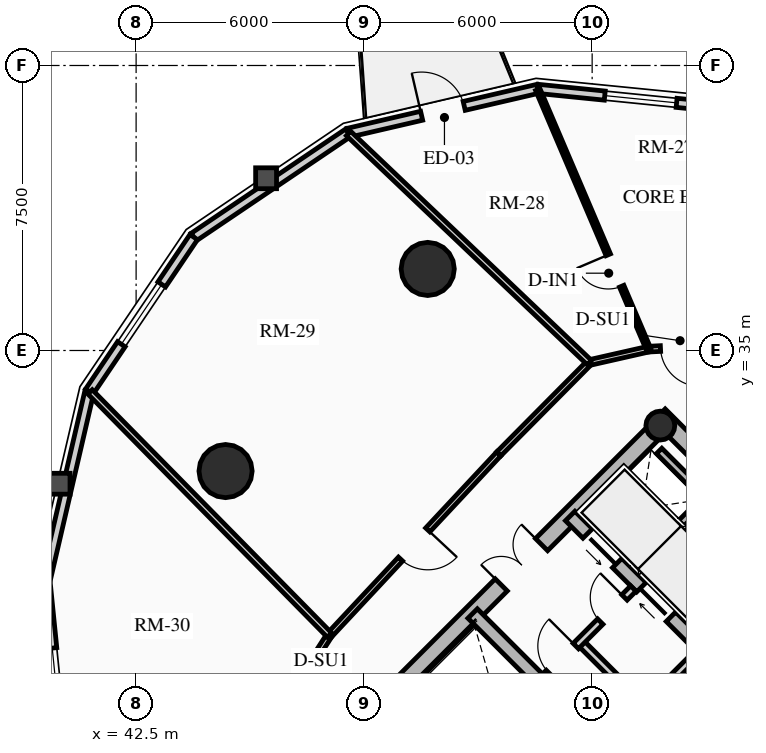
"""IFC4 building model, lengths in metres.
Left out: names, types, materials, properties, quantities, classifications, styles, units other than length and angle.
Written with IfcOpenShell. Run it as: python <this file> out.ifc"""

import sys

from ifc_helpers import new_model, si_unit, direction, frame, frame_2d, origin, origin_2d, place, context, subcontext, project, spatial, rectangle, circle, hollow_circle, extrude, source, transform, mapped, element, fill, save


model = new_model("IFC4")
c1 = context("Model", 3, precision=1e-05, world=origin(), true_north=direction((0.0, 1.0)))
c2 = subcontext(c1, "Body", "Model", "MODEL_VIEW")
j1 = project(units=[si_unit("LENGTHUNIT", "METRE"), si_unit("PLANEANGLEUNIT", "RADIAN")], contexts=[c1])
p1 = place(None, origin())
s1 = spatial("IfcSite", under=j1, at=p1, CompositionType="ELEMENT")
p2 = place(p1, origin())
s2 = spatial("IfcBuilding", under=s1, at=p2, CompositionType="ELEMENT")
p3 = place(p2, frame((0.0, 0.0, 78.88)))
s3 = spatial("IfcBuildingStorey", under=s2, at=p3, CompositionType="ELEMENT", Elevation=78.88)
p4 = place(p3, frame((66.303, 23.263, 0.0), z_axis=(0.0, 0.0, 1.0), x_axis=(-0.707106781187, 0.707106781187, 0.0)))
e1 = element("IfcWall", 1, at=p4, inside=s3, PredefinedType="SHEAR", context=c2, shape_type="SweptSolid", body=[
    extrude(rectangle(XDim=14.2, YDim=0.45, at=frame_2d((7.1, 0.0))), origin(), (0.0, 0.0, 1.0), 2.91),
])
p5 = place(p3, frame((48.856, 25.578, 0.0), z_axis=(0.0, 0.0, 1.0), x_axis=(0.707106781187, 0.707106781187, 0.0)))
e2 = element("IfcWall", 2, at=p5, inside=s3, PredefinedType="SHEAR", context=c2, shape_type="SweptSolid", body=[
    extrude(rectangle(XDim=10.7, YDim=0.45, at=frame_2d((5.35, 0.0))), origin(), (0.0, 0.0, 1.0), 2.91),
])
m1 = source(origin(), c2, "Body", "SweptSolid", [
    extrude(rectangle(XDim=1.5, YDim=2.02, at=frame_2d((0.75, 1.01))), frame((0.0, 0.235, 0.0), z_axis=(0.0, -1.0, 0.0), x_axis=(1.0, 0.0, 0.0)), (0.0, 0.0, 1.0), 0.47),
])
p6 = place(p5, frame((4.6, 0.0, 0.0)))
e3 = element("IfcOpeningElement", 3, at=p6, cuts=e2, PredefinedType="OPENING", context=c2, shape_type="MappedRepresentation", body=[
    mapped(m1, transform((0.0, 0.0, 0.0), x_axis=(1.0, 0.0, 0.0), y_axis=(0.0, 1.0, 0.0), z_axis=(0.0, 0.0, 1.0), scale=1.0)),
])
p7 = place(p3, frame((61.078, 18.355, 0.0), z_axis=(0.0, 0.0, 1.0), x_axis=(-0.707106781187, 0.707106781187, 0.0)))
e4 = element("IfcWall", 4, at=p7, inside=s3, PredefinedType="SHEAR", context=c2, shape_type="SweptSolid", body=[
    extrude(rectangle(XDim=13.75, YDim=0.35, at=frame_2d((6.875, 0.0))), origin(), (0.0, 0.0, 1.0), 2.91),
])
m2 = source(origin(), c2, "Body", "SweptSolid", [
    extrude(rectangle(XDim=1.1, YDim=2.015, at=frame_2d((0.55, 1.007))), frame((0.0, 0.185, 0.0), z_axis=(0.0, -1.0, 0.0), x_axis=(1.0, 0.0, 0.0)), (0.0, 0.0, 1.0), 0.37),
])
p8 = place(p7, frame((4.875, 0.0, 0.0)))
e5 = element("IfcOpeningElement", 5, at=p8, cuts=e4, PredefinedType="OPENING", context=c2, shape_type="MappedRepresentation", body=[
    mapped(m2, transform((0.0, 0.0, 0.0), x_axis=(1.0, 0.0, 0.0), y_axis=(0.0, 1.0, 0.0), z_axis=(0.0, 0.0, 1.0), scale=1.0)),
])
m3 = source(origin(), c2, "Body", "SweptSolid", [
    extrude(rectangle(XDim=1.15, YDim=2.02, at=frame_2d((0.575, 1.01))), frame((0.0, 0.185, 0.0), z_axis=(0.0, -1.0, 0.0), x_axis=(1.0, 0.0, 0.0)), (0.0, 0.0, 1.0), 0.37),
])
p9 = place(p7, frame((7.295, 0.0, 0.0)))
e6 = element("IfcOpeningElement", 6, at=p9, cuts=e4, PredefinedType="OPENING", context=c2, shape_type="MappedRepresentation", body=[
    mapped(m3, transform((0.0, 0.0, 0.0), x_axis=(1.0, 0.0, 0.0), y_axis=(0.0, 1.0, 0.0), z_axis=(0.0, 0.0, 1.0), scale=1.0)),
])
p10 = place(p3, frame((63.645, 20.922, 0.0), z_axis=(0.0, 0.0, 1.0), x_axis=(-0.707106781187, 0.707106781187, 0.0)))
e7 = element("IfcWall", 7, at=p10, inside=s3, PredefinedType="SHEAR", context=c2, shape_type="SweptSolid", body=[
    extrude(rectangle(XDim=13.75, YDim=0.35, at=frame_2d((6.875, 0.0))), origin(), (0.0, 0.0, 1.0), 2.91),
])
p11 = place(p10, frame((10.0, 0.0, 0.0)))
e8 = element("IfcOpeningElement", 8, at=p11, cuts=e7, PredefinedType="OPENING", context=c2, shape_type="MappedRepresentation", body=[
    mapped(m2, transform((0.0, 0.0, 0.0), x_axis=(1.0, 0.0, 0.0), y_axis=(0.0, 1.0, 0.0), z_axis=(0.0, 0.0, 1.0), scale=1.0)),
])
p12 = place(p10, frame((12.0, 0.0, 0.0)))
e9 = element("IfcOpeningElement", 9, at=p12, cuts=e7, PredefinedType="OPENING", context=c2, shape_type="MappedRepresentation", body=[
    mapped(m2, transform((0.0, 0.0, 0.0), x_axis=(1.0, 0.0, 0.0), y_axis=(0.0, 1.0, 0.0), z_axis=(0.0, 0.0, 1.0), scale=1.0)),
])
p13 = place(p10, frame((5.305, 0.0, 0.0)))
e10 = element("IfcOpeningElement", 10, at=p13, cuts=e7, PredefinedType="OPENING", context=c2, shape_type="MappedRepresentation", body=[
    mapped(m3, transform((0.0, 0.0, 0.0), x_axis=(1.0, 0.0, 0.0), y_axis=(0.0, 1.0, 0.0), z_axis=(0.0, 0.0, 1.0), scale=1.0)),
])
p14 = place(p3, frame((56.294, 33.024, 0.0), z_axis=(0.0, 0.0, 1.0), x_axis=(0.707106781187, 0.707106781187, 0.0)))
e11 = element("IfcColumn", 11, at=p14, inside=s3, PredefinedType="COLUMN", context=c2, shape_type="SweptSolid", body=[
    extrude(hollow_circle(Radius=0.38, WallThickness=0.032, at=origin_2d()), origin(), (0.0, 0.0, 1.0), 2.91),
])
for number, where, z_axis, x_axis in (
    (12, (50.173, 37.146, 0.0), (0.0, 0.0, 1.0), (1.0, 0.0, 0.0)),
    (13, (44.854, 31.827, 0.0), (0.0, 0.0, 1.0), (1.0, 0.0, 0.0)),
):
    element("IfcColumn", number, at=place(p3, frame(where, z_axis=z_axis, x_axis=x_axis)), inside=s3, PredefinedType="USERDEFINED", context=c2, shape_type="SweptSolid", body=[
        extrude(circle(Radius=0.7, at=origin_2d()), origin(), (0.0, 0.0, 1.0), 2.91),
    ])
p15 = place(p3, frame((53.067, 41.885, 0.0), z_axis=(0.0, 0.0, 1.0), x_axis=(0.994971754311, -0.10015591906, 0.0)))
e14 = element("IfcWall", 14, at=p15, inside=s3, PredefinedType="SOLIDWALL", context=c2, shape_type="SweptSolid", body=[
    extrude(rectangle(XDim=5.448, YDim=0.24, at=frame_2d((2.724, 0.0))), origin(), (0.0, 0.0, 1.0), 2.179),
])
m4 = source(origin(), c2, "Body", "SweptSolid", [
    extrude(rectangle(XDim=1.9, YDim=1.35, at=frame_2d((0.95, 0.675))), frame((0.0, 0.13, 0.0), z_axis=(0.0, -1.0, 0.0), x_axis=(1.0, 0.0, 0.0)), (0.0, 0.0, 1.0), 0.26),
])
p16 = place(p15, frame((1.774, 0.0, 0.65)))
e15 = element("IfcOpeningElement", 15, at=p16, cuts=e14, PredefinedType="OPENING", context=c2, shape_type="MappedRepresentation", body=[
    mapped(m4, transform((0.0, 0.0, 0.0), x_axis=(1.0, 0.0, 0.0), y_axis=(0.0, 1.0, 0.0), z_axis=(0.0, 0.0, 1.0), scale=1.0)),
])
p17 = place(p3, frame((48.08, 40.729, 0.0), z_axis=(0.0, 0.0, 1.0), x_axis=(0.974165631126, 0.225834725257, 0.0)))
e16 = element("IfcWall", 16, at=p17, inside=s3, PredefinedType="SOLIDWALL", context=c2, shape_type="SweptSolid", body=[
    extrude(rectangle(XDim=5.119, YDim=0.24, at=frame_2d((2.56, 0.0))), origin(), (0.0, 0.0, 1.0), 2.179),
])
m5 = source(origin(), c2, "Body", "SweptSolid", [
    extrude(rectangle(XDim=1.15, YDim=2.005, at=frame_2d((0.575, 1.002))), frame((0.0, 0.13, 0.0), z_axis=(0.0, -1.0, 0.0), x_axis=(1.0, 0.0, 0.0)), (0.0, 0.0, 1.0), 0.26),
])
p18 = place(p17, frame((1.984, 0.0, 0.0)))
e17 = element("IfcOpeningElement", 17, at=p18, cuts=e16, PredefinedType="OPENING", context=c2, shape_type="MappedRepresentation", body=[
    mapped(m5, transform((0.0, 0.0, 0.0), x_axis=(1.0, 0.0, 0.0), y_axis=(0.0, 1.0, 0.0), z_axis=(0.0, 0.0, 1.0), scale=1.0)),
])
p19 = place(p3, frame((44.015, 37.985, 0.0), z_axis=(0.0, 0.0, 1.0), x_axis=(0.828781148131, 0.559572880421, 0.0)))
e18 = element("IfcWall", 18, at=p19, inside=s3, PredefinedType="SOLIDWALL", context=c2, shape_type="SweptSolid", body=[
    extrude(rectangle(XDim=4.905, YDim=0.24, at=frame_2d((2.452, 0.0))), origin(), (0.0, 0.0, 1.0), 2.179),
])
p20 = place(p3, frame((41.271, 33.92, 0.0), z_axis=(0.0, 0.0, 1.0), x_axis=(0.559572880421, 0.828781148131, 0.0)))
e19 = element("IfcWall", 19, at=p20, inside=s3, PredefinedType="SOLIDWALL", context=c2, shape_type="SweptSolid", body=[
    extrude(rectangle(XDim=4.905, YDim=0.24, at=frame_2d((2.452, 0.0))), origin(), (0.0, 0.0, 1.0), 2.179),
])
p21 = place(p20, frame((1.502, 0.0, 0.65)))
e20 = element("IfcOpeningElement", 20, at=p21, cuts=e19, PredefinedType="OPENING", context=c2, shape_type="MappedRepresentation", body=[
    mapped(m4, transform((0.0, 0.0, 0.0), x_axis=(1.0, 0.0, 0.0), y_axis=(0.0, 1.0, 0.0), z_axis=(0.0, 0.0, 1.0), scale=1.0)),
])
p22 = place(p3, frame((40.115, 28.933, 0.0), z_axis=(0.0, 0.0, 1.0), x_axis=(0.225834725257, 0.974165631126, 0.0)))
e21 = element("IfcWall", 21, at=p22, inside=s3, PredefinedType="SOLIDWALL", context=c2, shape_type="SweptSolid", body=[
    extrude(rectangle(XDim=5.119, YDim=0.24, at=frame_2d((2.56, 0.0))), origin(), (0.0, 0.0, 1.0), 2.179),
])
p23 = place(p3, frame((40.661, 23.513, 0.0), z_axis=(0.0, 0.0, 1.0), x_axis=(-0.10015591906, 0.994971754311, 0.0)))
e22 = element("IfcWall", 22, at=p23, inside=s3, PredefinedType="SOLIDWALL", context=c2, shape_type="SweptSolid", body=[
    extrude(rectangle(XDim=5.448, YDim=0.24, at=frame_2d((2.724, 0.0))), origin(), (0.0, 0.0, 1.0), 2.179),
])
p24 = place(p23, frame((1.774, 0.0, 0.65)))
e23 = element("IfcOpeningElement", 23, at=p24, cuts=e22, PredefinedType="OPENING", context=c2, shape_type="MappedRepresentation", body=[
    mapped(m4, transform((0.0, 0.0, 0.0), x_axis=(1.0, 0.0, 0.0), y_axis=(0.0, 1.0, 0.0), z_axis=(0.0, 0.0, 1.0), scale=1.0)),
])
p25 = place(p3, frame((55.615, 29.227, 0.0), z_axis=(0.0, 0.0, 1.0), x_axis=(0.707147878904, 0.70706568108, 0.0)))
e24 = element("IfcWall", 24, at=p25, inside=s3, PredefinedType="SHEAR", context=c2, shape_type="SweptSolid", body=[
    extrude(rectangle(XDim=2.97, YDim=0.2, at=frame_2d((1.485, 0.0))), origin(), (0.0, 0.0, 1.0), 2.91),
])
p26 = place(p3, frame((57.419, 31.2, 0.0), z_axis=(0.0, 0.0, 1.0), x_axis=(-0.707032117043, 0.707181437447, 0.0)))
e25 = element("IfcWall", 25, at=p26, inside=s3, PredefinedType="SHEAR", context=c2, shape_type="SweptSolid", body=[
    extrude(rectangle(XDim=1.635, YDim=0.2, at=frame_2d((0.817, 0.0))), origin(), (0.0, 0.0, 1.0), 2.91),
])
p27 = place(p3, frame((54.961, 24.719, 0.0), z_axis=(0.0, 0.0, 1.0), x_axis=(0.707106781187, 0.707106781187, 0.0)))
e26 = element("IfcWall", 26, at=p27, inside=s3, PredefinedType="PARTITIONING", context=c2, shape_type="SweptSolid", body=[
    extrude(rectangle(XDim=3.28, YDim=0.2, at=frame_2d((1.64, 0.0))), origin(), (0.0, 0.0, 1.0), 2.655),
])
m6 = source(origin(), c2, "Body", "SweptSolid", [
    extrude(rectangle(XDim=0.9, YDim=2.005, at=frame_2d((0.45, 1.002))), frame((0.0, 0.11, 0.0), z_axis=(0.0, -1.0, 0.0), x_axis=(1.0, 0.0, 0.0)), (0.0, 0.0, 1.0), 0.22),
])
p28 = place(p27, frame((0.16, 0.0, 0.0)))
e27 = element("IfcOpeningElement", 27, at=p28, cuts=e26, PredefinedType="OPENING", context=c2, shape_type="MappedRepresentation", body=[
    mapped(m6, transform((0.0, 0.0, 0.0), x_axis=(1.0, 0.0, 0.0), y_axis=(0.0, 1.0, 0.0), z_axis=(0.0, 0.0, 1.0), scale=1.0)),
])
p29 = place(p3, frame((55.874, 25.631, 0.0), z_axis=(0.0, 0.0, 1.0), x_axis=(-0.707157639372, 0.707055919343, 0.0)))
e28 = element("IfcWall", 28, at=p29, inside=s3, PredefinedType="PARTITIONING", context=c2, shape_type="SweptSolid", body=[
    extrude(rectangle(XDim=2.4, YDim=0.2, at=frame_2d((1.2, 0.0))), origin(), (0.0, 0.0, 1.0), 2.655),
])
p30 = place(p3, frame((53.264, 26.416, 0.0), z_axis=(0.0, 0.0, 1.0), x_axis=(0.707106781187, 0.707106781187, 0.0)))
e29 = element("IfcWall", 29, at=p30, inside=s3, PredefinedType="PARTITIONING", context=c2, shape_type="SweptSolid", body=[
    extrude(rectangle(XDim=3.28, YDim=0.2, at=frame_2d((1.64, 0.0))), origin(), (0.0, 0.0, 1.0), 2.655),
])
m7 = source(origin(), c2, "Body", "SweptSolid", [
    extrude(rectangle(XDim=1.0, YDim=2.015, at=frame_2d((0.5, 1.007))), frame((0.0, 0.11, 0.0), z_axis=(0.0, -1.0, 0.0), x_axis=(1.0, 0.0, 0.0)), (0.0, 0.0, 1.0), 0.22),
])
p31 = place(p30, frame((0.14, 0.0, 0.0)))
e30 = element("IfcOpeningElement", 30, at=p31, cuts=e29, PredefinedType="OPENING", context=c2, shape_type="MappedRepresentation", body=[
    mapped(m7, transform((0.0, 0.0, 0.0), x_axis=(1.0, 0.0, 0.0), y_axis=(0.0, 1.0, 0.0), z_axis=(0.0, 0.0, 1.0), scale=1.0)),
])
p32 = place(p30, frame((2.05, 0.0, 0.0)))
e31 = element("IfcOpeningElement", 31, at=p32, cuts=e29, PredefinedType="OPENING", context=c2, shape_type="MappedRepresentation", body=[
    mapped(m6, transform((0.0, 0.0, 0.0), x_axis=(1.0, 0.0, 0.0), y_axis=(0.0, 1.0, 0.0), z_axis=(0.0, 0.0, 1.0), scale=1.0)),
])
p33 = place(p3, frame((57.467, 35.111, 0.0), z_axis=(0.0, 0.0, 1.0), x_axis=(-0.998691757323, -0.051134859488, 0.0)))
e32 = element("IfcWall", 32, at=p33, inside=s3, PredefinedType="PARTITIONING", context=c2, shape_type="SweptSolid", body=[
    extrude(rectangle(XDim=1.485, YDim=0.15, at=frame_2d((0.742, 0.0))), origin(), (0.0, 0.0, 1.0), 2.225),
])
m8 = source(origin(), c2, "Body", "SweptSolid", [
    extrude(rectangle(XDim=1.05, YDim=2.015, at=frame_2d((0.525, 1.007))), frame((0.0, 0.085, 0.0), z_axis=(0.0, -1.0, 0.0), x_axis=(1.0, 0.0, 0.0)), (0.0, 0.0, 1.0), 0.17),
])
p34 = place(p33, frame((0.12, 0.0, 0.0)))
e33 = element("IfcOpeningElement", 33, at=p34, cuts=e32, PredefinedType="OPENING", context=c2, shape_type="MappedRepresentation", body=[
    mapped(m8, transform((0.0, 0.0, 0.0), x_axis=(1.0, 0.0, 0.0), y_axis=(0.0, 1.0, 0.0), z_axis=(0.0, 0.0, 1.0), scale=1.0)),
])
p35 = place(p3, frame((55.984, 35.035, 0.0), z_axis=(0.0, 0.0, 1.0), x_axis=(-0.975290305708, -0.22092718165, 0.0)))
e34 = element("IfcWall", 34, at=p35, inside=s3, PredefinedType="PARTITIONING", context=c2, shape_type="SweptSolid", body=[
    extrude(rectangle(XDim=1.597, YDim=0.15, at=frame_2d((0.798, 0.0))), origin(), (0.0, 0.0, 1.0), 2.225),
])
p36 = place(p3, frame((54.427, 34.683, 0.0), z_axis=(0.0, 0.0, 1.0), x_axis=(-0.704178989986, -0.710022499687, 0.0)))
e35 = element("IfcWall", 35, at=p36, inside=s3, PredefinedType="PARTITIONING", context=c2, shape_type="SweptSolid", body=[
    extrude(rectangle(XDim=3.384, YDim=0.15, at=frame_2d((1.692, 0.0))), origin(), (0.0, 0.0, 1.0), 2.225),
])
p37 = place(p3, frame((52.043, 32.28, 0.0), z_axis=(0.0, 0.0, 1.0), x_axis=(-0.682606081633, -0.730786519661, 0.0)))
e36 = element("IfcWall", 36, at=p37, inside=s3, PredefinedType="PARTITIONING", context=c2, shape_type="SweptSolid", body=[
    extrude(rectangle(XDim=6.527, YDim=0.15, at=frame_2d((3.263, 0.0))), origin(), (0.0, 0.0, 1.0), 2.225),
])
p38 = place(p37, frame((2.738, 0.0, 0.0)))
e37 = element("IfcOpeningElement", 37, at=p38, cuts=e36, PredefinedType="OPENING", context=c2, shape_type="MappedRepresentation", body=[
    mapped(m8, transform((0.0, 0.0, 0.0), x_axis=(1.0, 0.0, 0.0), y_axis=(0.0, 1.0, 0.0), z_axis=(0.0, 0.0, 1.0), scale=1.0)),
])
p39 = place(p3, frame((47.588, 27.51, 0.0), z_axis=(0.0, 0.0, 1.0), x_axis=(-0.540202619347, -0.841534984449, 0.0)))
e38 = element("IfcWall", 38, at=p39, inside=s3, PredefinedType="PARTITIONING", context=c2, shape_type="SweptSolid", body=[
    extrude(rectangle(XDim=1.935, YDim=0.15, at=frame_2d((0.967, 0.0))), origin(), (0.0, 0.0, 1.0), 2.225),
])
p40 = place(p3, frame((54.427, 34.683, 0.0), z_axis=(0.0, 0.0, 1.0), x_axis=(-0.72454072322, 0.689231993161, 0.0)))
e39 = element("IfcWall", 39, at=p40, inside=s3, PredefinedType="PARTITIONING", context=c2, shape_type="SweptSolid", body=[
    extrude(rectangle(XDim=8.747, YDim=0.16, at=frame_2d((4.374, 0.0))), origin(), (0.0, 0.0, 1.0), 2.179),
])
p41 = place(p3, frame((47.588, 27.51, 0.0), z_axis=(0.0, 0.0, 1.0), x_axis=(-0.701457073903, 0.712711704318, 0.0)))
e40 = element("IfcWall", 40, at=p41, inside=s3, PredefinedType="PARTITIONING", context=c2, shape_type="SweptSolid", body=[
    extrude(rectangle(XDim=8.981, YDim=0.16, at=frame_2d((4.49, 0.0))), origin(), (0.0, 0.0, 1.0), 2.179),
])
p42 = place(p3, frame((55.984, 35.035, 0.0), z_axis=(0.0, 0.0, 1.0), x_axis=(-0.392438685048, 0.919778168081, 0.0)))
e41 = element("IfcWall", 41, at=p42, inside=s3, PredefinedType="PARTITIONING", context=c2, shape_type="SweptSolid", body=[
    extrude(rectangle(XDim=7.426, YDim=0.125, at=frame_2d((3.713, 0.0))), origin(), (0.0, 0.0, 1.0), 2.179),
])
m9 = source(origin(), c2, "Body", "SweptSolid", [
    extrude(rectangle(XDim=0.9, YDim=2.005, at=frame_2d((0.45, 1.002))), frame((0.0, 0.073, 0.0), z_axis=(0.0, -1.0, 0.0), x_axis=(1.0, 0.0, 0.0)), (0.0, 0.0, 1.0), 0.145),
])
p43 = place(p42, frame((1.8, 0.0, 0.0)))
e42 = element("IfcOpeningElement", 42, at=p43, cuts=e41, PredefinedType="OPENING", context=c2, shape_type="MappedRepresentation", body=[
    mapped(m9, transform((0.0, 0.0, 0.0), x_axis=(1.0, 0.0, 0.0), y_axis=(0.0, 1.0, 0.0), z_axis=(0.0, 0.0, 1.0), scale=1.0)),
])
m10 = source(origin(), c2, "Body", "SweptSolid", [
    extrude(rectangle(XDim=1.9, YDim=1.35, at=frame_2d((0.95, 0.675))), frame((0.0, 0.03, 0.0), z_axis=(0.0, -1.0, 0.0), x_axis=(1.0, 0.0, 0.0)), (0.0, 0.0, 1.0), 0.06),
])
p44 = place(p16, origin())
e43 = element("IfcWindow", 43, at=p44, inside=s3, PartitioningType="DOUBLE_PANEL_VERTICAL", PredefinedType="WINDOW", context=c2, shape_type="MappedRepresentation", body=[
    mapped(m10, transform((0.0, 0.0, 0.0), x_axis=(1.0, 0.0, 0.0), y_axis=(0.0, 1.0, 0.0), z_axis=(0.0, 0.0, 1.0), scale=1.0)),
])
fill(e15, e43)
m11 = source(origin(), c2, "Body", "SweptSolid", [
    extrude(rectangle(XDim=1.15, YDim=2.005, at=frame_2d((0.575, 1.002))), frame((0.0, 0.025, 0.0), z_axis=(0.0, -1.0, 0.0), x_axis=(1.0, 0.0, 0.0)), (0.0, 0.0, 1.0), 0.05),
])
p45 = place(p18, origin())
e44 = element("IfcDoor", 44, at=p45, inside=s3, OperationType="SINGLE_SWING_LEFT", PredefinedType="DOOR", context=c2, shape_type="MappedRepresentation", body=[
    mapped(m11, transform((0.0, 0.0, 0.0), x_axis=(1.0, 0.0, 0.0), y_axis=(0.0, 1.0, 0.0), z_axis=(0.0, 0.0, 1.0), scale=1.0)),
])
fill(e17, e44)
p46 = place(p21, origin())
e45 = element("IfcWindow", 45, at=p46, inside=s3, PartitioningType="DOUBLE_PANEL_VERTICAL", PredefinedType="WINDOW", context=c2, shape_type="MappedRepresentation", body=[
    mapped(m10, transform((0.0, 0.0, 0.0), x_axis=(1.0, 0.0, 0.0), y_axis=(0.0, 1.0, 0.0), z_axis=(0.0, 0.0, 1.0), scale=1.0)),
])
fill(e20, e45)
p47 = place(p24, origin())
e46 = element("IfcWindow", 46, at=p47, inside=s3, PartitioningType="DOUBLE_PANEL_VERTICAL", PredefinedType="WINDOW", context=c2, shape_type="MappedRepresentation", body=[
    mapped(m10, transform((0.0, 0.0, 0.0), x_axis=(1.0, 0.0, 0.0), y_axis=(0.0, 1.0, 0.0), z_axis=(0.0, 0.0, 1.0), scale=1.0)),
])
fill(e23, e46)
m12 = source(origin(), c2, "Body", "SweptSolid", [
    extrude(rectangle(XDim=1.1, YDim=2.015, at=frame_2d((0.55, 1.007))), frame((0.0, 0.025, 0.0), z_axis=(0.0, -1.0, 0.0), x_axis=(1.0, 0.0, 0.0)), (0.0, 0.0, 1.0), 0.05),
])
p48 = place(p11, origin())
e47 = element("IfcDoor", 47, at=p48, inside=s3, OperationType="SLIDING_TO_RIGHT", PredefinedType="DOOR", context=c2, shape_type="MappedRepresentation", body=[
    mapped(m12, transform((0.0, 0.0, 0.0), x_axis=(1.0, 0.0, 0.0), y_axis=(0.0, 1.0, 0.0), z_axis=(0.0, 0.0, 1.0), scale=1.0)),
])
fill(e8, e47)
p49 = place(p12, origin())
e48 = element("IfcDoor", 48, at=p49, inside=s3, OperationType="SLIDING_TO_LEFT", PredefinedType="DOOR", context=c2, shape_type="MappedRepresentation", body=[
    mapped(m12, transform((0.0, 0.0, 0.0), x_axis=(1.0, 0.0, 0.0), y_axis=(0.0, 1.0, 0.0), z_axis=(0.0, 0.0, 1.0), scale=1.0)),
])
fill(e9, e48)
m13 = source(origin(), c2, "Body", "SweptSolid", [
    extrude(rectangle(XDim=1.5, YDim=2.02, at=frame_2d((0.75, 1.01))), frame((0.0, 0.025, 0.0), z_axis=(0.0, -1.0, 0.0), x_axis=(1.0, 0.0, 0.0)), (0.0, 0.0, 1.0), 0.05),
])
p50 = place(p6, origin())
e49 = element("IfcDoor", 49, at=p50, inside=s3, OperationType="DOUBLE_DOOR_SINGLE_SWING", PredefinedType="DOOR", context=c2, shape_type="MappedRepresentation", body=[
    mapped(m13, transform((0.0, 0.0, 0.0), x_axis=(1.0, 0.0, 0.0), y_axis=(0.0, 1.0, 0.0), z_axis=(0.0, 0.0, 1.0), scale=1.0)),
])
fill(e3, e49)
m14 = source(origin(), c2, "Body", "SweptSolid", [
    extrude(rectangle(XDim=1.0, YDim=2.015, at=frame_2d((0.5, 1.007))), frame((0.0, 0.025, 0.0), z_axis=(0.0, -1.0, 0.0), x_axis=(1.0, 0.0, 0.0)), (0.0, 0.0, 1.0), 0.05),
])
p51 = place(p31, origin())
e50 = element("IfcDoor", 50, at=p51, inside=s3, OperationType="SINGLE_SWING_RIGHT", PredefinedType="DOOR", context=c2, shape_type="MappedRepresentation", body=[
    mapped(m14, transform((0.0, 0.0, 0.0), x_axis=(1.0, 0.0, 0.0), y_axis=(0.0, 1.0, 0.0), z_axis=(0.0, 0.0, 1.0), scale=1.0)),
])
fill(e30, e50)
m15 = source(origin(), c2, "Body", "SweptSolid", [
    extrude(rectangle(XDim=0.9, YDim=2.005, at=frame_2d((0.45, 1.002))), frame((0.0, 0.025, 0.0), z_axis=(0.0, -1.0, 0.0), x_axis=(1.0, 0.0, 0.0)), (0.0, 0.0, 1.0), 0.05),
])
p52 = place(p32, origin())
e51 = element("IfcDoor", 51, at=p52, inside=s3, OperationType="SINGLE_SWING_RIGHT", PredefinedType="DOOR", context=c2, shape_type="MappedRepresentation", body=[
    mapped(m15, transform((0.0, 0.0, 0.0), x_axis=(1.0, 0.0, 0.0), y_axis=(0.0, 1.0, 0.0), z_axis=(0.0, 0.0, 1.0), scale=1.0)),
])
fill(e31, e51)
m16 = source(origin(), c2, "Body", "SweptSolid", [
    extrude(rectangle(XDim=1.05, YDim=2.015, at=frame_2d((0.525, 1.007))), frame((0.0, 0.025, 0.0), z_axis=(0.0, -1.0, 0.0), x_axis=(1.0, 0.0, 0.0)), (0.0, 0.0, 1.0), 0.05),
])
p53 = place(p34, origin())
e52 = element("IfcDoor", 52, at=p53, inside=s3, OperationType="SINGLE_SWING_LEFT", PredefinedType="DOOR", context=c2, shape_type="MappedRepresentation", body=[
    mapped(m16, transform((0.0, 0.0, 0.0), x_axis=(1.0, 0.0, 0.0), y_axis=(0.0, 1.0, 0.0), z_axis=(0.0, 0.0, 1.0), scale=1.0)),
])
fill(e33, e52)
p54 = place(p43, origin())
e53 = element("IfcDoor", 53, at=p54, inside=s3, OperationType="SINGLE_SWING_RIGHT", PredefinedType="DOOR", context=c2, shape_type="MappedRepresentation", body=[
    mapped(m15, transform((0.0, 0.0, 0.0), x_axis=(1.0, 0.0, 0.0), y_axis=(0.0, 1.0, 0.0), z_axis=(0.0, 0.0, 1.0), scale=1.0)),
])
fill(e42, e53)
p55 = place(p38, origin())
e54 = element("IfcDoor", 54, at=p55, inside=s3, OperationType="SINGLE_SWING_LEFT", PredefinedType="DOOR", context=c2, shape_type="MappedRepresentation", body=[
    mapped(m16, transform((0.0, 0.0, 0.0), x_axis=(1.0, 0.0, 0.0), y_axis=(0.0, 1.0, 0.0), z_axis=(0.0, 0.0, 1.0), scale=1.0)),
])
fill(e37, e54)
save(model, sys.argv[1])
